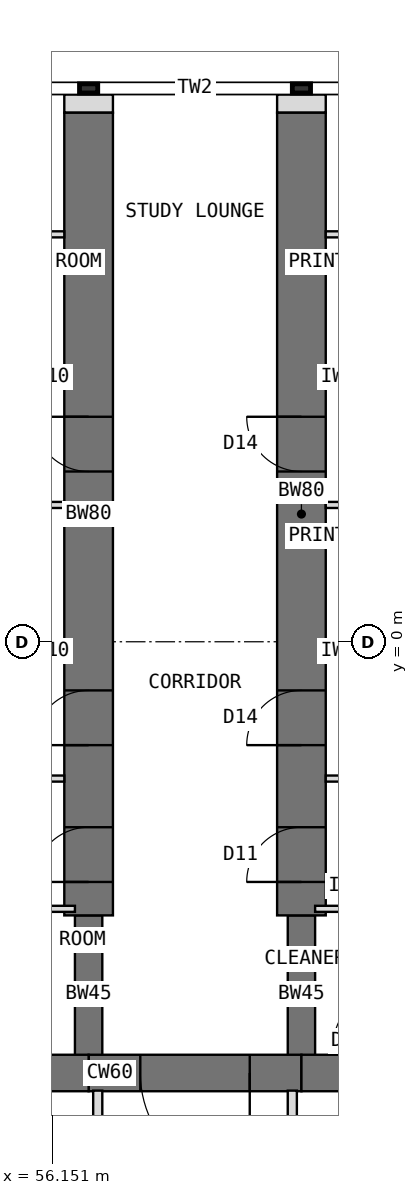
"""IFC4 building model, lengths in metres.
Left out: names, types, materials, properties, quantities, classifications, styles, units other than length and angle.
Written with IfcOpenShell. Run it as: python <this file> out.ifc"""

import sys

from ifc_helpers import new_model, si_unit, direction, frame, frame_2d, origin, place, context, subcontext, project, spatial, rectangle, extrude, element, fill, save


model = new_model("IFC4")
c1 = context("Model", 3, precision=1e-05, world=origin(), true_north=direction((0.0, 1.0)))
c2 = subcontext(c1, "Body", "Model", "MODEL_VIEW")
j1 = project(units=[si_unit("LENGTHUNIT", "METRE"), si_unit("PLANEANGLEUNIT", "RADIAN")], contexts=[c1])
p1 = place(None, origin())
s1 = spatial("IfcSite", under=j1, at=p1, CompositionType="ELEMENT")
p2 = place(p1, origin())
s2 = spatial("IfcBuilding", under=s1, at=p2, CompositionType="ELEMENT")
p3 = place(p2, frame((0.0, 0.0, 145.5)))
s3 = spatial("IfcBuildingStorey", under=s2, at=p3, CompositionType="ELEMENT", Elevation=145.5)
p4 = place(p3, frame((64.798, -7.092, 0.0), z_axis=(0.0, 0.0, 1.0), x_axis=(-1.0, 0.0, 0.0)))
e1 = element("IfcWall", 1, at=p4, inside=s3, PredefinedType="SHEAR", context=c2, shape_type="SweptSolid", body=[
    extrude(rectangle(XDim=4.548, YDim=0.6, at=frame_2d((2.274, 0.0))), origin(), (0.0, 0.0, 1.0), 4.0),
])
p5 = place(p3, frame((60.25, -7.092, 0.0), z_axis=(0.0, 0.0, 1.0), x_axis=(-1.0, 0.0, 0.0)))
e2 = element("IfcWall", 2, at=p5, inside=s3, PredefinedType="SHEAR", context=c2, shape_type="SweptSolid", body=[
    extrude(rectangle(XDim=3.5, YDim=0.6, at=frame_2d((1.75, 0.0))), origin(), (0.0, 0.0, 1.0), 4.0),
])
p6 = place(p5, frame((0.85, 0.0, 0.0)))
e3 = element("IfcOpeningElement", 3, at=p6, cuts=e2, PredefinedType="OPENING", context=c2, shape_type="SweptSolid", body=[
    extrude(rectangle(XDim=1.8, YDim=2.1, at=frame_2d((0.9, 1.05))), frame((0.0, 0.31, 0.0), z_axis=(0.0, -1.0, 0.0), x_axis=(1.0, 0.0, 0.0)), (0.0, 0.0, 1.0), 0.62),
])
p7 = place(p3, frame((56.75, -7.092, 0.0), z_axis=(0.0, 0.0, 1.0), x_axis=(-1.0, 0.0, 0.0)))
e4 = element("IfcWall", 4, at=p7, inside=s3, PredefinedType="SHEAR", context=c2, shape_type="SweptSolid", body=[
    extrude(rectangle(XDim=4.548, YDim=0.6, at=frame_2d((2.274, 0.0))), origin(), (0.0, 0.0, 1.0), 4.0),
])
p8 = place(p3, frame((56.75, -7.092, 0.0), z_axis=(0.0, 0.0, 1.0), x_axis=(0.0, 1.0, 0.0)))
e5 = element("IfcWall", 5, at=p8, inside=s3, PredefinedType="SHEAR", context=c2, shape_type="SweptSolid", body=[
    extrude(rectangle(XDim=2.592, YDim=0.45, at=frame_2d((1.296, 0.0))), origin(), (0.0, 0.0, 1.0), 4.0),
])
p9 = place(p3, frame((56.75, -4.5, 0.0), z_axis=(0.0, 0.0, 1.0), x_axis=(0.0, 1.0, 0.0)))
e6 = element("IfcWall", 6, at=p9, inside=s3, PredefinedType="SHEAR", context=c2, shape_type="SweptSolid", body=[
    extrude(rectangle(XDim=13.2, YDim=0.8, at=frame_2d((6.6, 0.0))), origin(), (0.0, 0.0, 1.0), 4.0),
])
p10 = place(p9, frame((0.55, 0.0, 0.0)))
e7 = element("IfcOpeningElement", 7, at=p10, cuts=e6, PredefinedType="OPENING", context=c2, shape_type="SweptSolid", body=[
    extrude(rectangle(XDim=0.9, YDim=2.1, at=frame_2d((0.45, 1.05))), frame((0.0, 0.41, 0.0), z_axis=(0.0, -1.0, 0.0), x_axis=(1.0, 0.0, 0.0)), (0.0, 0.0, 1.0), 0.82),
])
p11 = place(p9, frame((2.8, 0.0, 0.0)))
e8 = element("IfcOpeningElement", 8, at=p11, cuts=e6, PredefinedType="OPENING", context=c2, shape_type="SweptSolid", body=[
    extrude(rectangle(XDim=0.9, YDim=2.1, at=frame_2d((0.45, 1.05))), frame((0.0, 0.41, 0.0), z_axis=(0.0, -1.0, 0.0), x_axis=(1.0, 0.0, 0.0)), (0.0, 0.0, 1.0), 0.82),
])
p12 = place(p9, frame((7.3, 0.0, 0.0)))
e9 = element("IfcOpeningElement", 9, at=p12, cuts=e6, PredefinedType="OPENING", context=c2, shape_type="SweptSolid", body=[
    extrude(rectangle(XDim=0.9, YDim=2.1, at=frame_2d((0.45, 1.05))), frame((0.0, 0.41, 0.0), z_axis=(0.0, -1.0, 0.0), x_axis=(1.0, 0.0, 0.0)), (0.0, 0.0, 1.0), 0.82),
])
p13 = place(p3, frame((60.25, -7.092, 0.0), z_axis=(0.0, 0.0, 1.0), x_axis=(0.0, 1.0, 0.0)))
e10 = element("IfcWall", 10, at=p13, inside=s3, PredefinedType="SHEAR", context=c2, shape_type="SweptSolid", body=[
    extrude(rectangle(XDim=2.592, YDim=0.45, at=frame_2d((1.296, 0.0))), origin(), (0.0, 0.0, 1.0), 4.0),
])
p14 = place(p3, frame((60.25, -4.5, 0.0), z_axis=(0.0, 0.0, 1.0), x_axis=(0.0, 1.0, 0.0)))
e11 = element("IfcWall", 11, at=p14, inside=s3, PredefinedType="SHEAR", context=c2, shape_type="SweptSolid", body=[
    extrude(rectangle(XDim=13.2, YDim=0.8, at=frame_2d((6.6, 0.0))), origin(), (0.0, 0.0, 1.0), 4.0),
])
p15 = place(p14, frame((0.55, 0.0, 0.0)))
e12 = element("IfcOpeningElement", 12, at=p15, cuts=e11, PredefinedType="OPENING", context=c2, shape_type="SweptSolid", body=[
    extrude(rectangle(XDim=0.9, YDim=2.1, at=frame_2d((0.45, 1.05))), frame((0.0, 0.41, 0.0), z_axis=(0.0, -1.0, 0.0), x_axis=(1.0, 0.0, 0.0)), (0.0, 0.0, 1.0), 0.82),
])
p16 = place(p14, frame((2.8, 0.0, 0.0)))
e13 = element("IfcOpeningElement", 13, at=p16, cuts=e11, PredefinedType="OPENING", context=c2, shape_type="SweptSolid", body=[
    extrude(rectangle(XDim=0.9, YDim=2.1, at=frame_2d((0.45, 1.05))), frame((0.0, 0.41, 0.0), z_axis=(0.0, -1.0, 0.0), x_axis=(1.0, 0.0, 0.0)), (0.0, 0.0, 1.0), 0.82),
])
p17 = place(p14, frame((7.3, 0.0, 0.0)))
e14 = element("IfcOpeningElement", 14, at=p17, cuts=e11, PredefinedType="OPENING", context=c2, shape_type="SweptSolid", body=[
    extrude(rectangle(XDim=0.9, YDim=2.1, at=frame_2d((0.45, 1.05))), frame((0.0, 0.41, 0.0), z_axis=(0.0, -1.0, 0.0), x_axis=(1.0, 0.0, 0.0)), (0.0, 0.0, 1.0), 0.82),
])
for number, where, z_axis, x_axis in (
    (15, (56.75, 8.7, 0.0), (0.0, 0.0, 1.0), (0.0, 1.0, 0.0)),
    (16, (60.25, 8.7, 0.0), (0.0, 0.0, 1.0), (0.0, 1.0, 0.0)),
):
    element("IfcWall", number, at=place(p3, frame(where, z_axis=z_axis, x_axis=x_axis)), inside=s3, PredefinedType="PARTITIONING", context=c2, shape_type="SweptSolid", body=[
        extrude(rectangle(XDim=0.3, YDim=0.8, at=frame_2d((0.15, 0.0))), origin(), (0.0, 0.0, 1.0), 3.8),
    ])
for number, where, z_axis, x_axis in (
    (17, (56.35, -2.25, 0.0), (0.0, 0.0, 1.0), (-1.0, 0.0, 0.0)),
    (18, (56.35, 2.25, 0.0), (0.0, 0.0, 1.0), (-1.0, 0.0, 0.0)),
):
    element("IfcWall", number, at=place(p3, frame(where, z_axis=z_axis, x_axis=x_axis)), inside=s3, PredefinedType="PARTITIONING", context=c2, shape_type="SweptSolid", body=[
        extrude(rectangle(XDim=4.6, YDim=0.1, at=frame_2d((2.3, 0.0))), origin(), (0.0, 0.0, 1.0), 3.8),
    ])
p18 = place(p3, frame((56.35, -0.15, 0.0), z_axis=(0.0, 0.0, 1.0), x_axis=(-1.0, 0.0, 0.0)))
e19 = element("IfcWall", 19, at=p18, inside=s3, PredefinedType="PARTITIONING", context=c2, shape_type="SweptSolid", body=[
    extrude(rectangle(XDim=2.4, YDim=0.1, at=frame_2d((1.2, 0.0))), origin(), (0.0, 0.0, 1.0), 3.8),
])
p19 = place(p18, frame((0.75, 0.0, 0.0)))
e20 = element("IfcOpeningElement", 20, at=p19, cuts=e19, PredefinedType="OPENING", context=c2, shape_type="SweptSolid", body=[
    extrude(rectangle(XDim=0.9, YDim=2.1, at=frame_2d((0.45, 1.05))), frame((0.0, 0.06, 0.0), z_axis=(0.0, -1.0, 0.0), x_axis=(1.0, 0.0, 0.0)), (0.0, 0.0, 1.0), 0.12),
])
p20 = place(p3, frame((56.35, 4.35, 0.0), z_axis=(0.0, 0.0, 1.0), x_axis=(-1.0, 0.0, 0.0)))
e21 = element("IfcWall", 21, at=p20, inside=s3, PredefinedType="PARTITIONING", context=c2, shape_type="SweptSolid", body=[
    extrude(rectangle(XDim=2.4, YDim=0.1, at=frame_2d((1.2, 0.0))), origin(), (0.0, 0.0, 1.0), 3.8),
])
p21 = place(p20, frame((0.75, 0.0, 0.0)))
e22 = element("IfcOpeningElement", 22, at=p21, cuts=e21, PredefinedType="OPENING", context=c2, shape_type="SweptSolid", body=[
    extrude(rectangle(XDim=0.9, YDim=2.1, at=frame_2d((0.45, 1.05))), frame((0.0, 0.06, 0.0), z_axis=(0.0, -1.0, 0.0), x_axis=(1.0, 0.0, 0.0)), (0.0, 0.0, 1.0), 0.12),
])
p22 = place(p3, frame((56.35, 6.7, 0.0), z_axis=(0.0, 0.0, 1.0), x_axis=(-1.0, 0.0, 0.0)))
e23 = element("IfcWall", 23, at=p22, inside=s3, PredefinedType="PARTITIONING", context=c2, shape_type="SweptSolid", body=[
    extrude(rectangle(XDim=2.4, YDim=0.1, at=frame_2d((1.2, 0.0))), origin(), (0.0, 0.0, 1.0), 3.8),
])
p23 = place(p3, frame((56.525, -4.392, 0.0), z_axis=(0.0, 0.0, 1.0), x_axis=(-1.0, 0.0, 0.0)))
e24 = element("IfcWall", 24, at=p23, inside=s3, PredefinedType="PARTITIONING", context=c2, shape_type="SweptSolid", body=[
    extrude(rectangle(XDim=3.2, YDim=0.1, at=frame_2d((1.6, 0.0))), origin(), (0.0, 0.0, 1.0), 3.8),
])
for number, where, z_axis, x_axis in (
    (25, (60.65, -2.25, 0.0), (0.0, 0.0, 1.0), (1.0, 0.0, 0.0)),
    (26, (60.65, 2.25, 0.0), (0.0, 0.0, 1.0), (1.0, 0.0, 0.0)),
):
    element("IfcWall", number, at=place(p3, frame(where, z_axis=z_axis, x_axis=x_axis)), inside=s3, PredefinedType="PARTITIONING", context=c2, shape_type="SweptSolid", body=[
        extrude(rectangle(XDim=4.6, YDim=0.1, at=frame_2d((2.3, 0.0))), origin(), (0.0, 0.0, 1.0), 3.8),
    ])
p24 = place(p3, frame((60.65, -0.15, 0.0), z_axis=(0.0, 0.0, 1.0), x_axis=(1.0, 0.0, 0.0)))
e27 = element("IfcWall", 27, at=p24, inside=s3, PredefinedType="PARTITIONING", context=c2, shape_type="SweptSolid", body=[
    extrude(rectangle(XDim=2.4, YDim=0.1, at=frame_2d((1.2, 0.0))), origin(), (0.0, 0.0, 1.0), 3.8),
])
p25 = place(p24, frame((0.75, 0.0, 0.0)))
e28 = element("IfcOpeningElement", 28, at=p25, cuts=e27, PredefinedType="OPENING", context=c2, shape_type="SweptSolid", body=[
    extrude(rectangle(XDim=0.9, YDim=2.1, at=frame_2d((0.45, 1.05))), frame((0.0, 0.06, 0.0), z_axis=(0.0, -1.0, 0.0), x_axis=(1.0, 0.0, 0.0)), (0.0, 0.0, 1.0), 0.12),
])
p26 = place(p3, frame((60.65, 4.35, 0.0), z_axis=(0.0, 0.0, 1.0), x_axis=(1.0, 0.0, 0.0)))
e29 = element("IfcWall", 29, at=p26, inside=s3, PredefinedType="PARTITIONING", context=c2, shape_type="SweptSolid", body=[
    extrude(rectangle(XDim=2.4, YDim=0.1, at=frame_2d((1.2, 0.0))), origin(), (0.0, 0.0, 1.0), 3.8),
])
p27 = place(p26, frame((0.75, 0.0, 0.0)))
e30 = element("IfcOpeningElement", 30, at=p27, cuts=e29, PredefinedType="OPENING", context=c2, shape_type="SweptSolid", body=[
    extrude(rectangle(XDim=0.9, YDim=2.1, at=frame_2d((0.45, 1.05))), frame((0.0, 0.06, 0.0), z_axis=(0.0, -1.0, 0.0), x_axis=(1.0, 0.0, 0.0)), (0.0, 0.0, 1.0), 0.12),
])
p28 = place(p3, frame((60.65, 6.7, 0.0), z_axis=(0.0, 0.0, 1.0), x_axis=(1.0, 0.0, 0.0)))
e31 = element("IfcWall", 31, at=p28, inside=s3, PredefinedType="PARTITIONING", context=c2, shape_type="SweptSolid", body=[
    extrude(rectangle(XDim=2.4, YDim=0.1, at=frame_2d((1.2, 0.0))), origin(), (0.0, 0.0, 1.0), 3.8),
])
p29 = place(p3, frame((60.475, -4.392, 0.0), z_axis=(0.0, 0.0, 1.0), x_axis=(1.0, 0.0, 0.0)))
e32 = element("IfcWall", 32, at=p29, inside=s3, PredefinedType="PARTITIONING", context=c2, shape_type="SweptSolid", body=[
    extrude(rectangle(XDim=1.2, YDim=0.1, at=frame_2d((0.6, 0.0))), origin(), (0.0, 0.0, 1.0), 3.8),
])
p30 = place(p3, frame((56.9, -11.9, 0.0), z_axis=(0.0, 0.0, 1.0), x_axis=(0.0, 1.0, 0.0)))
e33 = element("IfcWall", 33, at=p30, inside=s3, PredefinedType="PARTITIONING", context=c2, shape_type="SweptSolid", body=[
    extrude(rectangle(XDim=4.519, YDim=0.15, at=frame_2d((2.259, 0.0))), origin(), (0.0, 0.0, 1.0), 3.8),
])
p31 = place(p30, frame((1.769, 0.0, 0.0)))
e34 = element("IfcOpeningElement", 34, at=p31, cuts=e33, PredefinedType="OPENING", context=c2, shape_type="SweptSolid", body=[
    extrude(rectangle(XDim=1.0, YDim=2.1, at=frame_2d((0.5, 1.05))), frame((0.0, 0.085, 0.0), z_axis=(0.0, -1.0, 0.0), x_axis=(1.0, 0.0, 0.0)), (0.0, 0.0, 1.0), 0.17),
])
p32 = place(p3, frame((60.1, -7.382, 0.0), z_axis=(0.0, 0.0, 1.0), x_axis=(0.0, -1.0, 0.0)))
e35 = element("IfcWall", 35, at=p32, inside=s3, PredefinedType="PARTITIONING", context=c2, shape_type="SweptSolid", body=[
    extrude(rectangle(XDim=4.519, YDim=0.15, at=frame_2d((2.259, 0.0))), origin(), (0.0, 0.0, 1.0), 3.8),
])
p33 = place(p32, frame((1.749, 0.0, 0.0)))
e36 = element("IfcOpeningElement", 36, at=p33, cuts=e35, PredefinedType="OPENING", context=c2, shape_type="SweptSolid", body=[
    extrude(rectangle(XDim=1.0, YDim=2.1, at=frame_2d((0.5, 1.05))), frame((0.0, 0.085, 0.0), z_axis=(0.0, -1.0, 0.0), x_axis=(1.0, 0.0, 0.0)), (0.0, 0.0, 1.0), 0.17),
])
p34 = place(p6, origin())
e37 = element("IfcDoor", 37, at=p34, inside=s3, OperationType="DOUBLE_DOOR_DOUBLE_SWING", PredefinedType="DOOR", context=c2, shape_type="SweptSolid", body=[
    extrude(rectangle(XDim=1.72, YDim=2.06, at=frame_2d((0.9, 1.03))), frame((0.0, 0.025, 0.0), z_axis=(0.0, -1.0, 0.0), x_axis=(1.0, 0.0, 0.0)), (0.0, 0.0, 1.0), 0.05),
    extrude(rectangle(XDim=0.04, YDim=2.1, at=frame_2d((0.02, 1.05))), frame((0.0, 0.3, 0.0), z_axis=(0.0, -1.0, 0.0), x_axis=(1.0, 0.0, 0.0)), (0.0, 0.0, 1.0), 0.6),
    extrude(rectangle(XDim=0.04, YDim=2.1, at=frame_2d((1.78, 1.05))), frame((0.0, 0.3, 0.0), z_axis=(0.0, -1.0, 0.0), x_axis=(1.0, 0.0, 0.0)), (0.0, 0.0, 1.0), 0.6),
    extrude(rectangle(XDim=1.72, YDim=0.04, at=frame_2d((0.9, 2.08))), frame((0.0, 0.3, 0.0), z_axis=(0.0, -1.0, 0.0), x_axis=(1.0, 0.0, 0.0)), (0.0, 0.0, 1.0), 0.6),
])
fill(e3, e37)
p35 = place(p10, origin())
e38 = element("IfcDoor", 38, at=p35, inside=s3, OperationType="SINGLE_SWING_LEFT", PredefinedType="DOOR", context=c2, shape_type="SweptSolid", body=[
    extrude(rectangle(XDim=0.82, YDim=2.06, at=frame_2d((0.45, 1.03))), frame((0.0, 0.025, 0.0), z_axis=(0.0, -1.0, 0.0), x_axis=(1.0, 0.0, 0.0)), (0.0, 0.0, 1.0), 0.05),
    extrude(rectangle(XDim=0.04, YDim=2.1, at=frame_2d((0.02, 1.05))), frame((0.0, 0.4, 0.0), z_axis=(0.0, -1.0, 0.0), x_axis=(1.0, 0.0, 0.0)), (0.0, 0.0, 1.0), 0.8),
    extrude(rectangle(XDim=0.04, YDim=2.1, at=frame_2d((0.88, 1.05))), frame((0.0, 0.4, 0.0), z_axis=(0.0, -1.0, 0.0), x_axis=(1.0, 0.0, 0.0)), (0.0, 0.0, 1.0), 0.8),
    extrude(rectangle(XDim=0.82, YDim=0.04, at=frame_2d((0.45, 2.08))), frame((0.0, 0.4, 0.0), z_axis=(0.0, -1.0, 0.0), x_axis=(1.0, 0.0, 0.0)), (0.0, 0.0, 1.0), 0.8),
])
fill(e7, e38)
p36 = place(p11, origin())
e39 = element("IfcDoor", 39, at=p36, inside=s3, OperationType="SINGLE_SWING_LEFT", PredefinedType="DOOR", context=c2, shape_type="SweptSolid", body=[
    extrude(rectangle(XDim=0.82, YDim=2.06, at=frame_2d((0.45, 1.03))), frame((0.0, 0.025, 0.0), z_axis=(0.0, -1.0, 0.0), x_axis=(1.0, 0.0, 0.0)), (0.0, 0.0, 1.0), 0.05),
    extrude(rectangle(XDim=0.04, YDim=2.1, at=frame_2d((0.02, 1.05))), frame((0.0, 0.4, 0.0), z_axis=(0.0, -1.0, 0.0), x_axis=(1.0, 0.0, 0.0)), (0.0, 0.0, 1.0), 0.8),
    extrude(rectangle(XDim=0.04, YDim=2.1, at=frame_2d((0.88, 1.05))), frame((0.0, 0.4, 0.0), z_axis=(0.0, -1.0, 0.0), x_axis=(1.0, 0.0, 0.0)), (0.0, 0.0, 1.0), 0.8),
    extrude(rectangle(XDim=0.82, YDim=0.04, at=frame_2d((0.45, 2.08))), frame((0.0, 0.4, 0.0), z_axis=(0.0, -1.0, 0.0), x_axis=(1.0, 0.0, 0.0)), (0.0, 0.0, 1.0), 0.8),
])
fill(e8, e39)
p37 = place(p12, origin())
e40 = element("IfcDoor", 40, at=p37, inside=s3, OperationType="SINGLE_SWING_RIGHT", PredefinedType="DOOR", context=c2, shape_type="SweptSolid", body=[
    extrude(rectangle(XDim=0.82, YDim=2.06, at=frame_2d((0.45, 1.03))), frame((0.0, 0.025, 0.0), z_axis=(0.0, -1.0, 0.0), x_axis=(1.0, 0.0, 0.0)), (0.0, 0.0, 1.0), 0.05),
    extrude(rectangle(XDim=0.04, YDim=2.1, at=frame_2d((0.02, 1.05))), frame((0.0, 0.4, 0.0), z_axis=(0.0, -1.0, 0.0), x_axis=(1.0, 0.0, 0.0)), (0.0, 0.0, 1.0), 0.8),
    extrude(rectangle(XDim=0.04, YDim=2.1, at=frame_2d((0.88, 1.05))), frame((0.0, 0.4, 0.0), z_axis=(0.0, -1.0, 0.0), x_axis=(1.0, 0.0, 0.0)), (0.0, 0.0, 1.0), 0.8),
    extrude(rectangle(XDim=0.82, YDim=0.04, at=frame_2d((0.45, 2.08))), frame((0.0, 0.4, 0.0), z_axis=(0.0, -1.0, 0.0), x_axis=(1.0, 0.0, 0.0)), (0.0, 0.0, 1.0), 0.8),
])
fill(e9, e40)
p38 = place(p15, origin())
e41 = element("IfcDoor", 41, at=p38, inside=s3, OperationType="SINGLE_SWING_LEFT", PredefinedType="DOOR", context=c2, shape_type="SweptSolid", body=[
    extrude(rectangle(XDim=0.82, YDim=2.06, at=frame_2d((0.45, 1.03))), frame((0.0, 0.025, 0.0), z_axis=(0.0, -1.0, 0.0), x_axis=(1.0, 0.0, 0.0)), (0.0, 0.0, 1.0), 0.05),
    extrude(rectangle(XDim=0.04, YDim=2.1, at=frame_2d((0.02, 1.05))), frame((0.0, 0.4, 0.0), z_axis=(0.0, -1.0, 0.0), x_axis=(1.0, 0.0, 0.0)), (0.0, 0.0, 1.0), 0.8),
    extrude(rectangle(XDim=0.04, YDim=2.1, at=frame_2d((0.88, 1.05))), frame((0.0, 0.4, 0.0), z_axis=(0.0, -1.0, 0.0), x_axis=(1.0, 0.0, 0.0)), (0.0, 0.0, 1.0), 0.8),
    extrude(rectangle(XDim=0.82, YDim=0.04, at=frame_2d((0.45, 2.08))), frame((0.0, 0.4, 0.0), z_axis=(0.0, -1.0, 0.0), x_axis=(1.0, 0.0, 0.0)), (0.0, 0.0, 1.0), 0.8),
])
fill(e12, e41)
p39 = place(p16, origin())
e42 = element("IfcDoor", 42, at=p39, inside=s3, OperationType="SINGLE_SWING_LEFT", PredefinedType="DOOR", context=c2, shape_type="SweptSolid", body=[
    extrude(rectangle(XDim=0.82, YDim=2.06, at=frame_2d((0.45, 1.03))), frame((0.0, 0.025, 0.0), z_axis=(0.0, -1.0, 0.0), x_axis=(1.0, 0.0, 0.0)), (0.0, 0.0, 1.0), 0.05),
    extrude(rectangle(XDim=0.04, YDim=2.1, at=frame_2d((0.02, 1.05))), frame((0.0, 0.4, 0.0), z_axis=(0.0, -1.0, 0.0), x_axis=(1.0, 0.0, 0.0)), (0.0, 0.0, 1.0), 0.8),
    extrude(rectangle(XDim=0.04, YDim=2.1, at=frame_2d((0.88, 1.05))), frame((0.0, 0.4, 0.0), z_axis=(0.0, -1.0, 0.0), x_axis=(1.0, 0.0, 0.0)), (0.0, 0.0, 1.0), 0.8),
    extrude(rectangle(XDim=0.82, YDim=0.04, at=frame_2d((0.45, 2.08))), frame((0.0, 0.4, 0.0), z_axis=(0.0, -1.0, 0.0), x_axis=(1.0, 0.0, 0.0)), (0.0, 0.0, 1.0), 0.8),
])
fill(e13, e42)
p40 = place(p17, origin())
e43 = element("IfcDoor", 43, at=p40, inside=s3, OperationType="SINGLE_SWING_RIGHT", PredefinedType="DOOR", context=c2, shape_type="SweptSolid", body=[
    extrude(rectangle(XDim=0.82, YDim=2.06, at=frame_2d((0.45, 1.03))), frame((0.0, 0.025, 0.0), z_axis=(0.0, -1.0, 0.0), x_axis=(1.0, 0.0, 0.0)), (0.0, 0.0, 1.0), 0.05),
    extrude(rectangle(XDim=0.04, YDim=2.1, at=frame_2d((0.02, 1.05))), frame((0.0, 0.4, 0.0), z_axis=(0.0, -1.0, 0.0), x_axis=(1.0, 0.0, 0.0)), (0.0, 0.0, 1.0), 0.8),
    extrude(rectangle(XDim=0.04, YDim=2.1, at=frame_2d((0.88, 1.05))), frame((0.0, 0.4, 0.0), z_axis=(0.0, -1.0, 0.0), x_axis=(1.0, 0.0, 0.0)), (0.0, 0.0, 1.0), 0.8),
    extrude(rectangle(XDim=0.82, YDim=0.04, at=frame_2d((0.45, 2.08))), frame((0.0, 0.4, 0.0), z_axis=(0.0, -1.0, 0.0), x_axis=(1.0, 0.0, 0.0)), (0.0, 0.0, 1.0), 0.8),
])
fill(e14, e43)
save(model, sys.argv[1])
